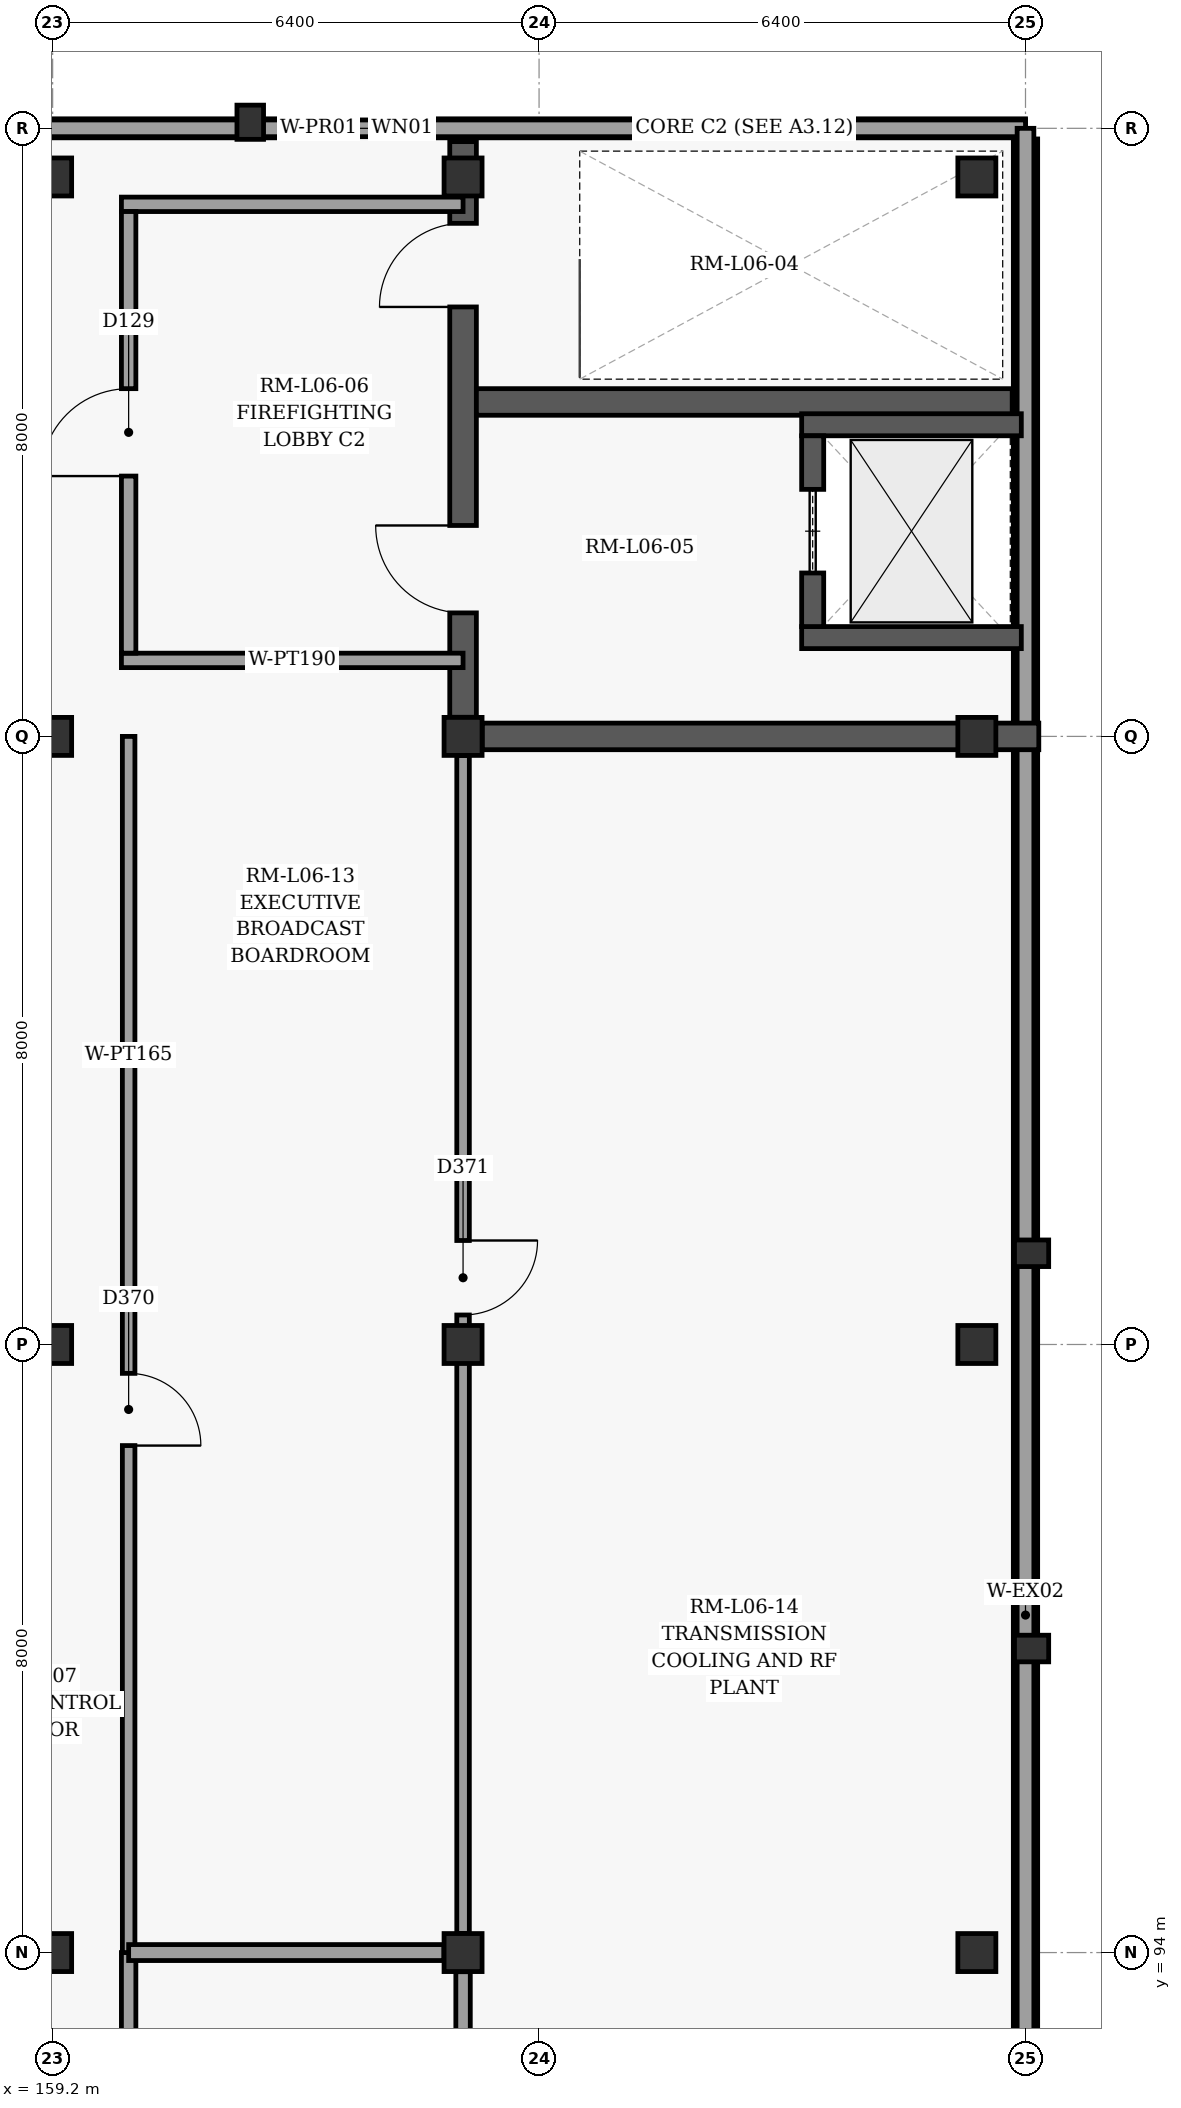
"""IFC4 building model, lengths in metres.
Left out: names, types, materials, properties, quantities, classifications, styles, units other than length and angle.
Written with IfcOpenShell. Run it as: python <this file> out.ifc"""

import sys

from ifc_helpers import new_model, si_unit, direction, frame, frame_2d, origin, origin_2d, place, context, subcontext, project, spatial, rectangle, extrude, element, fill, save


model = new_model("IFC4")
c1 = context("Model", 3, precision=1e-05, world=origin(), true_north=direction((0.0, 1.0)))
c2 = subcontext(c1, "Body", "Model", "MODEL_VIEW")
j1 = project(units=[si_unit("LENGTHUNIT", "METRE"), si_unit("PLANEANGLEUNIT", "RADIAN")], contexts=[c1])
p1 = place(None, origin())
s1 = spatial("IfcSite", under=j1, at=p1, CompositionType="ELEMENT")
p2 = place(p1, origin())
s2 = spatial("IfcBuilding", under=s1, at=p2, CompositionType="ELEMENT")
p3 = place(p2, frame((0.0, 0.0, 29.4)))
s3 = spatial("IfcBuildingStorey", under=s2, at=p3, CompositionType="ELEMENT", Elevation=29.4)
for number, where, z_axis, x_axis in (
    (1, (159.2, 94.0, 0.0), (0.0, 0.0, 1.0), (1.0, 0.0, 0.0)),
    (2, (159.2, 102.0, 0.0), (0.0, 0.0, 1.0), (1.0, 0.0, 0.0)),
    (3, (159.2, 110.0, 0.0), (0.0, 0.0, 1.0), (1.0, 0.0, 0.0)),
    (4, (159.2, 117.36, 0.0), (0.0, 0.0, 1.0), (1.0, 0.0, 0.0)),
    (5, (164.6, 94.0, 0.0), (0.0, 0.0, 1.0), (1.0, 0.0, 0.0)),
    (6, (164.6, 102.0, 0.0), (0.0, 0.0, 1.0), (1.0, 0.0, 0.0)),
    (7, (164.6, 110.0, 0.0), (0.0, 0.0, 1.0), (1.0, 0.0, 0.0)),
    (8, (164.6, 117.36, 0.0), (0.0, 0.0, 1.0), (1.0, 0.0, 0.0)),
    (9, (171.36, 94.0, 0.0), (0.0, 0.0, 1.0), (1.0, 0.0, 0.0)),
    (10, (171.36, 102.0, 0.0), (0.0, 0.0, 1.0), (1.0, 0.0, 0.0)),
    (11, (171.36, 110.0, 0.0), (0.0, 0.0, 1.0), (1.0, 0.0, 0.0)),
    (12, (171.36, 117.36, 0.0), (0.0, 0.0, 1.0), (1.0, 0.0, 0.0)),
):
    element("IfcColumn", number, at=place(p3, frame(where, z_axis=z_axis, x_axis=x_axis)), inside=s3, PredefinedType="COLUMN", context=c2, shape_type="SweptSolid", body=[
        extrude(rectangle(XDim=0.5, YDim=0.5, at=origin_2d()), origin(), (0.0, 0.0, 1.0), 4.5),
    ])
for number, where, z_axis, x_axis in (
    (13, (172.08, 92.8, 0.0), (0.0, 0.0, 1.0), (1.0, 0.0, 0.0)),
    (14, (172.08, 98.0, 0.0), (0.0, 0.0, 1.0), (1.0, 0.0, 0.0)),
    (15, (172.08, 103.2, 0.0), (0.0, 0.0, 1.0), (1.0, 0.0, 0.0)),
    (16, (161.8, 118.08, 0.0), (0.0, 0.0, 1.0), (0.0, 1.0, 0.0)),
):
    element("IfcColumn", number, at=place(p3, frame(where, z_axis=z_axis, x_axis=x_axis)), inside=s3, PredefinedType="PILASTER", context=c2, shape_type="SweptSolid", body=[
        extrude(rectangle(XDim=0.35, YDim=0.45, at=origin_2d()), origin(), (0.0, 0.0, 1.0), 4.5),
    ])
p4 = place(p3, frame((152.8, 118.0, 0.0), z_axis=(0.0, 0.0, 1.0), x_axis=(1.0, 0.0, 0.0)))
e17 = element("IfcWall", 17, at=p4, inside=s3, PredefinedType="SOLIDWALL", context=c2, shape_type="SweptSolid", body=[
    extrude(rectangle(XDim=19.2, YDim=0.25, at=frame_2d((9.6, 0.0))), origin(), (0.0, 0.0, 1.0), 4.255),
])
p5 = place(p4, frame((0.75, 0.0, 0.9)))
e18 = element("IfcOpeningElement", 18, at=p5, cuts=e17, PredefinedType="OPENING", context=c2, shape_type="SweptSolid", body=[
    extrude(rectangle(XDim=1.6, YDim=1.65, at=frame_2d((0.8, 0.825))), frame((0.0, 0.135, 0.0), z_axis=(0.0, -1.0, 0.0), x_axis=(1.0, 0.0, 0.0)), (0.0, 0.0, 1.0), 0.27),
])
p6 = place(p4, frame((10.0, 0.0, 0.9)))
e19 = element("IfcOpeningElement", 19, at=p6, cuts=e17, PredefinedType="OPENING", context=c2, shape_type="SweptSolid", body=[
    extrude(rectangle(XDim=1.4, YDim=2.1, at=frame_2d((0.7, 1.05))), frame((0.0, 0.135, 0.0), z_axis=(0.0, -1.0, 0.0), x_axis=(1.0, 0.0, 0.0)), (0.0, 0.0, 1.0), 0.27),
])
p7 = place(p3, frame((172.0, 117.86, 0.0), z_axis=(0.0, 0.0, 1.0), x_axis=(0.0, -1.0, 0.0)))
e20 = element("IfcWall", 20, at=p7, inside=s3, PredefinedType="SOLIDWALL", context=c2, shape_type="SweptSolid", body=[
    extrude(rectangle(XDim=46.12, YDim=0.32, at=frame_2d((23.06, 0.0))), origin(), (0.0, 0.0, 1.0), 4.255),
])
p8 = place(p3, frame((152.8, 118.0, 4.5), z_axis=(0.0, 0.0, 1.0), x_axis=(1.0, 0.0, 0.0)))
e21 = element("IfcWall", 21, at=p8, inside=s3, PredefinedType="PARAPET", context=c2, shape_type="SweptSolid", body=[
    extrude(rectangle(XDim=19.2, YDim=0.22, at=frame_2d((9.6, 0.0))), origin(), (0.0, 0.0, 1.0), 0.95),
])
p9 = place(p3, frame((172.0, 118.0, 4.5), z_axis=(0.0, 0.0, 1.0), x_axis=(0.0, -1.0, 0.0)))
e22 = element("IfcWall", 22, at=p9, inside=s3, PredefinedType="PARAPET", context=c2, shape_type="SweptSolid", body=[
    extrude(rectangle(XDim=46.4, YDim=0.22, at=frame_2d((23.2, 0.0))), origin(), (0.0, 0.0, 1.0), 0.95),
])
p10 = place(p3, frame((164.852, 110.0, 0.0), z_axis=(0.0, 0.0, 1.0), x_axis=(1.0, 0.0, 0.0)))
e23 = element("IfcWall", 23, at=p10, inside=s3, PredefinedType="SHEAR", context=c2, shape_type="SweptSolid", body=[
    extrude(rectangle(XDim=7.323, YDim=0.35, at=frame_2d((3.662, 0.0))), origin(), (0.0, 0.0, 1.0), 4.255),
])
p11 = place(p3, frame((164.6, 110.252, 0.0), z_axis=(0.0, 0.0, 1.0), x_axis=(0.0, 1.0, 0.0)))
e24 = element("IfcWall", 24, at=p11, inside=s3, PredefinedType="SHEAR", context=c2, shape_type="SweptSolid", body=[
    extrude(rectangle(XDim=7.573, YDim=0.35, at=frame_2d((3.787, 0.0))), origin(), (0.0, 0.0, 1.0), 4.255),
])
p12 = place(p11, frame((5.398, 0.0, 0.0)))
e25 = element("IfcOpeningElement", 25, at=p12, cuts=e24, PredefinedType="OPENING", context=c2, shape_type="SweptSolid", body=[
    extrude(rectangle(XDim=1.1, YDim=2.15, at=frame_2d((0.55, 1.075))), frame((0.0, 0.185, 0.0), z_axis=(0.0, -1.0, 0.0), x_axis=(1.0, 0.0, 0.0)), (0.0, 0.0, 1.0), 0.37),
])
p13 = place(p11, frame((1.373, 0.0, 0.0)))
e26 = element("IfcOpeningElement", 26, at=p13, cuts=e24, PredefinedType="OPENING", context=c2, shape_type="SweptSolid", body=[
    extrude(rectangle(XDim=1.15, YDim=2.2, at=frame_2d((0.575, 1.1))), frame((0.0, 0.185, 0.0), z_axis=(0.0, -1.0, 0.0), x_axis=(1.0, 0.0, 0.0)), (0.0, 0.0, 1.0), 0.37),
])
p14 = place(p3, frame((164.775, 114.4, 0.0), z_axis=(0.0, 0.0, 1.0), x_axis=(1.0, 0.0, 0.0)))
e27 = element("IfcWall", 27, at=p14, inside=s3, PredefinedType="SHEAR", context=c2, shape_type="SweptSolid", body=[
    extrude(rectangle(XDim=7.05, YDim=0.35, at=frame_2d((3.525, 0.0))), origin(), (0.0, 0.0, 1.0), 4.255),
])
for number, where, z_axis, x_axis in (
    (28, (169.055, 111.3, 0.0), (0.0, 0.0, 1.0), (1.0, 0.0, 0.0)),
    (29, (169.055, 114.1, 0.0), (0.0, 0.0, 1.0), (1.0, 0.0, 0.0)),
):
    element("IfcWall", number, at=place(p3, frame(where, z_axis=z_axis, x_axis=x_axis)), inside=s3, PredefinedType="SHEAR", context=c2, shape_type="SweptSolid", body=[
        extrude(rectangle(XDim=2.89, YDim=0.29, at=frame_2d((1.445, 0.0))), origin(), (0.0, 0.0, 1.0), 4.255),
    ])
p15 = place(p3, frame((169.2, 111.445, 0.0), z_axis=(0.0, 0.0, 1.0), x_axis=(0.0, 1.0, 0.0)))
e30 = element("IfcWall", 30, at=p15, inside=s3, PredefinedType="SHEAR", context=c2, shape_type="SweptSolid", body=[
    extrude(rectangle(XDim=2.51, YDim=0.29, at=frame_2d((1.255, 0.0))), origin(), (0.0, 0.0, 1.0), 4.255),
])
p16 = place(p15, frame((0.705, 0.0, 0.0)))
e31 = element("IfcOpeningElement", 31, at=p16, cuts=e30, PredefinedType="OPENING", context=c2, shape_type="SweptSolid", body=[
    extrude(rectangle(XDim=1.1, YDim=2.15, at=frame_2d((0.55, 1.075))), frame((0.0, 0.155, 0.0), z_axis=(0.0, -1.0, 0.0), x_axis=(1.0, 0.0, 0.0)), (0.0, 0.0, 1.0), 0.31),
])
p17 = place(p3, frame((160.105, 111.0, 0.0), z_axis=(0.0, 0.0, 1.0), x_axis=(1.0, 0.0, 0.0)))
e32 = element("IfcWall", 32, at=p17, inside=s3, PredefinedType="PARTITIONING", context=c2, shape_type="SweptSolid", body=[
    extrude(rectangle(XDim=4.495, YDim=0.19, at=frame_2d((2.248, 0.0))), origin(), (0.0, 0.0, 1.0), 4.255),
])
p18 = place(p3, frame((160.105, 117.0, 0.0), z_axis=(0.0, 0.0, 1.0), x_axis=(1.0, 0.0, 0.0)))
e33 = element("IfcWall", 33, at=p18, inside=s3, PredefinedType="PARTITIONING", context=c2, shape_type="SweptSolid", body=[
    extrude(rectangle(XDim=4.495, YDim=0.19, at=frame_2d((2.248, 0.0))), origin(), (0.0, 0.0, 1.0), 3.605),
])
p19 = place(p3, frame((160.2, 111.095, 0.0), z_axis=(0.0, 0.0, 1.0), x_axis=(0.0, 1.0, 0.0)))
e34 = element("IfcWall", 34, at=p19, inside=s3, PredefinedType="PARTITIONING", context=c2, shape_type="SweptSolid", body=[
    extrude(rectangle(XDim=5.81, YDim=0.19, at=frame_2d((2.905, 0.0))), origin(), (0.0, 0.0, 1.0), 4.255),
])
p20 = place(p19, frame((2.33, 0.0, 0.0)))
e35 = element("IfcOpeningElement", 35, at=p20, cuts=e34, PredefinedType="OPENING", context=c2, shape_type="SweptSolid", body=[
    extrude(rectangle(XDim=1.15, YDim=2.2, at=frame_2d((0.575, 1.1))), frame((0.0, 0.105, 0.0), z_axis=(0.0, -1.0, 0.0), x_axis=(1.0, 0.0, 0.0)), (0.0, 0.0, 1.0), 0.21),
])
p21 = place(p3, frame((160.2, 94.0, 0.0), z_axis=(0.0, 0.0, 1.0), x_axis=(0.0, -1.0, 0.0)))
e36 = element("IfcWall", 36, at=p21, inside=s3, PredefinedType="PARTITIONING", context=c2, shape_type="SweptSolid", body=[
    extrude(rectangle(XDim=14.4, YDim=0.19, at=frame_2d((7.2, 0.0))), origin(), (0.0, 0.0, 1.0), 4.255),
])
p22 = place(p21, frame((6.78, 0.0, 0.0)))
e37 = element("IfcOpeningElement", 37, at=p22, cuts=e36, PredefinedType="OPENING", context=c2, shape_type="SweptSolid", body=[
    extrude(rectangle(XDim=1.12, YDim=2.15, at=frame_2d((0.56, 1.075))), frame((0.0, 0.105, 0.0), z_axis=(0.0, -1.0, 0.0), x_axis=(1.0, 0.0, 0.0)), (0.0, 0.0, 1.0), 0.21),
])
p23 = place(p3, frame((160.2, 110.0, 0.0), z_axis=(0.0, 0.0, 1.0), x_axis=(0.0, -1.0, 0.0)))
e38 = element("IfcWall", 38, at=p23, inside=s3, PredefinedType="PARTITIONING", context=c2, shape_type="SweptSolid", body=[
    extrude(rectangle(XDim=16.0, YDim=0.165, at=frame_2d((8.0, 0.0))), origin(), (0.0, 0.0, 1.0), 4.255),
])
p24 = place(p23, frame((8.38, 0.0, 0.0)))
e39 = element("IfcOpeningElement", 39, at=p24, cuts=e38, PredefinedType="OPENING", context=c2, shape_type="SweptSolid", body=[
    extrude(rectangle(XDim=0.95, YDim=2.1, at=frame_2d((0.475, 1.05))), frame((0.0, 0.093, 0.0), z_axis=(0.0, -1.0, 0.0), x_axis=(1.0, 0.0, 0.0)), (0.0, 0.0, 1.0), 0.185),
])
p25 = place(p3, frame((160.2, 94.0, 0.0), z_axis=(0.0, 0.0, 1.0), x_axis=(1.0, 0.0, 0.0)))
e40 = element("IfcWall", 40, at=p25, inside=s3, PredefinedType="PARTITIONING", context=c2, shape_type="SweptSolid", body=[
    extrude(rectangle(XDim=4.148, YDim=0.21, at=frame_2d((2.074, 0.0))), origin(), (0.0, 0.0, 1.0), 3.605),
])
p26 = place(p3, frame((164.6, 93.748, 0.0), z_axis=(0.0, 0.0, 1.0), x_axis=(0.0, -1.0, 0.0)))
e41 = element("IfcWall", 41, at=p26, inside=s3, PredefinedType="PARTITIONING", context=c2, shape_type="SweptSolid", body=[
    extrude(rectangle(XDim=13.896, YDim=0.19, at=frame_2d((6.948, 0.0))), origin(), (0.0, 0.0, 1.0), 3.405),
])
p27 = place(p3, frame((164.6, 109.748, 0.0), z_axis=(0.0, 0.0, 1.0), x_axis=(0.0, -1.0, 0.0)))
e42 = element("IfcWall", 42, at=p27, inside=s3, PredefinedType="PARTITIONING", context=c2, shape_type="SweptSolid", body=[
    extrude(rectangle(XDim=15.496, YDim=0.165, at=frame_2d((7.748, 0.0))), origin(), (0.0, 0.0, 1.0), 3.405),
])
p28 = place(p27, frame((6.38, 0.0, 0.0)))
e43 = element("IfcOpeningElement", 43, at=p28, cuts=e42, PredefinedType="OPENING", context=c2, shape_type="SweptSolid", body=[
    extrude(rectangle(XDim=0.98, YDim=2.1, at=frame_2d((0.49, 1.05))), frame((0.0, 0.093, 0.0), z_axis=(0.0, -1.0, 0.0), x_axis=(1.0, 0.0, 0.0)), (0.0, 0.0, 1.0), 0.185),
])
p29 = place(p6, origin())
e44 = element("IfcWindow", 44, at=p29, inside=s3, PartitioningType="SINGLE_PANEL", PredefinedType="WINDOW", context=c2, shape_type="SweptSolid", body=[
    extrude(rectangle(XDim=1.4, YDim=2.1, at=frame_2d((0.7, 1.05))), frame((0.0, 0.03, 0.0), z_axis=(0.0, -1.0, 0.0), x_axis=(1.0, 0.0, 0.0)), (0.0, 0.0, 1.0), 0.06),
])
fill(e19, e44)
p30 = place(p12, origin())
e45 = element("IfcDoor", 45, at=p30, inside=s3, OperationType="SINGLE_SWING_LEFT", PredefinedType="DOOR", context=c2, shape_type="SweptSolid", body=[
    extrude(rectangle(XDim=1.1, YDim=2.15, at=frame_2d((0.55, 1.075))), frame((0.0, 0.025, 0.0), z_axis=(0.0, -1.0, 0.0), x_axis=(1.0, 0.0, 0.0)), (0.0, 0.0, 1.0), 0.05),
])
fill(e25, e45)
p31 = place(p13, origin())
e46 = element("IfcDoor", 46, at=p31, inside=s3, OperationType="SINGLE_SWING_RIGHT", PredefinedType="DOOR", context=c2, shape_type="SweptSolid", body=[
    extrude(rectangle(XDim=1.15, YDim=2.2, at=frame_2d((0.575, 1.1))), frame((0.0, 0.025, 0.0), z_axis=(0.0, -1.0, 0.0), x_axis=(1.0, 0.0, 0.0)), (0.0, 0.0, 1.0), 0.05),
])
fill(e26, e46)
p32 = place(p16, origin())
e47 = element("IfcDoor", 47, at=p32, inside=s3, OperationType="SLIDING_TO_LEFT", PredefinedType="DOOR", context=c2, shape_type="SweptSolid", body=[
    extrude(rectangle(XDim=1.1, YDim=2.15, at=frame_2d((0.55, 1.075))), frame((0.0, 0.025, 0.0), z_axis=(0.0, -1.0, 0.0), x_axis=(1.0, 0.0, 0.0)), (0.0, 0.0, 1.0), 0.05),
])
fill(e31, e47)
p33 = place(p20, origin())
e48 = element("IfcDoor", 48, at=p33, inside=s3, OperationType="SINGLE_SWING_LEFT", PredefinedType="DOOR", context=c2, shape_type="SweptSolid", body=[
    extrude(rectangle(XDim=1.15, YDim=2.2, at=frame_2d((0.575, 1.1))), frame((0.0, 0.025, 0.0), z_axis=(0.0, -1.0, 0.0), x_axis=(1.0, 0.0, 0.0)), (0.0, 0.0, 1.0), 0.05),
])
fill(e35, e48)
p34 = place(p24, origin())
e49 = element("IfcDoor", 49, at=p34, inside=s3, OperationType="SINGLE_SWING_RIGHT", PredefinedType="DOOR", context=c2, shape_type="SweptSolid", body=[
    extrude(rectangle(XDim=0.95, YDim=2.1, at=frame_2d((0.475, 1.05))), frame((0.0, 0.025, 0.0), z_axis=(0.0, -1.0, 0.0), x_axis=(1.0, 0.0, 0.0)), (0.0, 0.0, 1.0), 0.05),
])
fill(e39, e49)
p35 = place(p28, origin())
e50 = element("IfcDoor", 50, at=p35, inside=s3, OperationType="SINGLE_SWING_LEFT", PredefinedType="DOOR", context=c2, shape_type="SweptSolid", body=[
    extrude(rectangle(XDim=0.98, YDim=2.1, at=frame_2d((0.49, 1.05))), frame((0.0, 0.025, 0.0), z_axis=(0.0, -1.0, 0.0), x_axis=(1.0, 0.0, 0.0)), (0.0, 0.0, 1.0), 0.05),
])
fill(e43, e50)
save(model, sys.argv[1])
